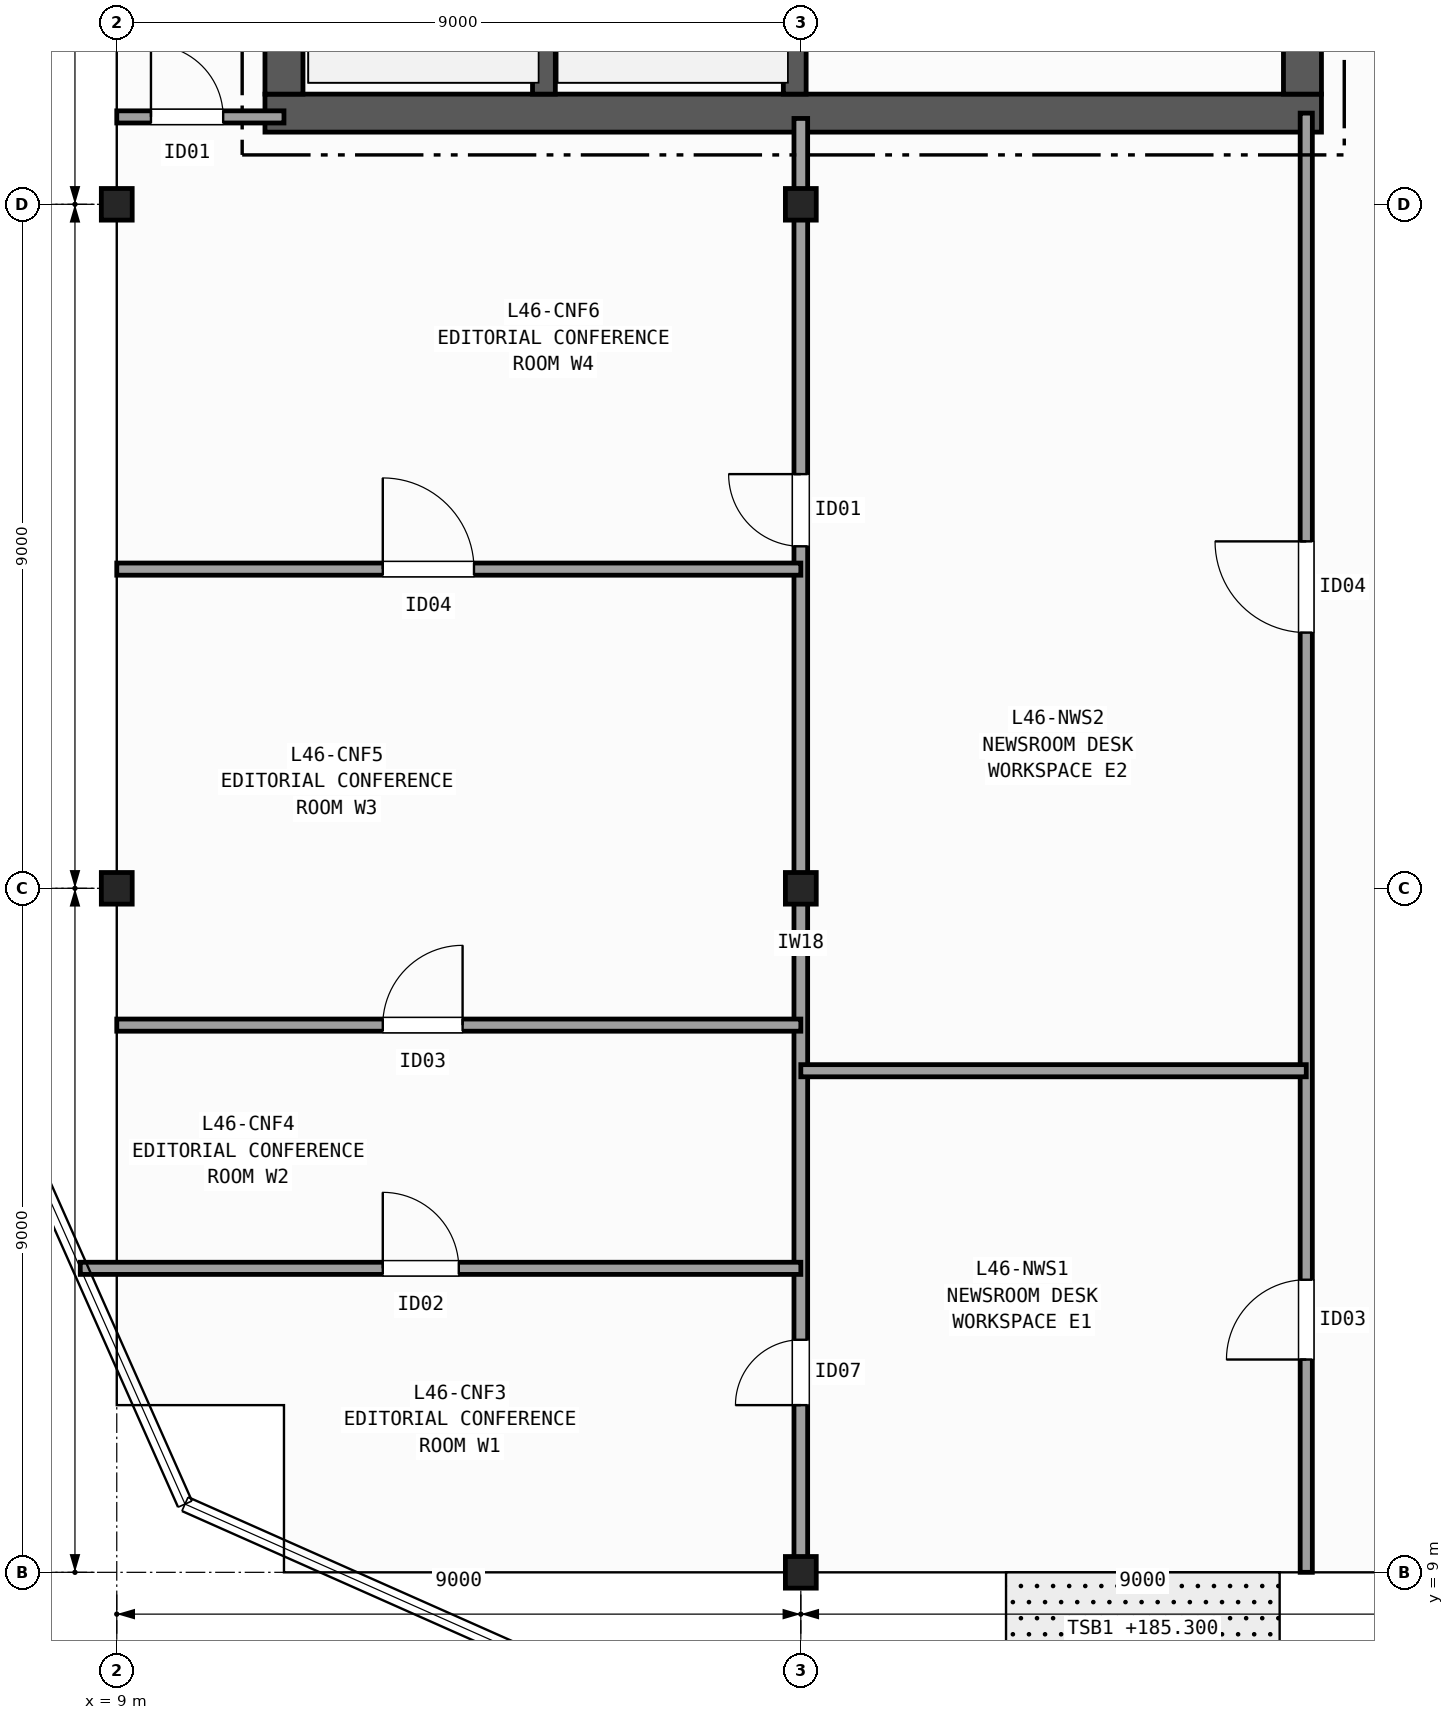
"""IFC4 building model, lengths in metres.
Left out: names, types, materials, properties, quantities, classifications, styles, units other than length and angle.
Written with IfcOpenShell. Run it as: python <this file> out.ifc"""

import sys

from ifc_helpers import new_model, si_unit, direction, frame, frame_2d, origin, origin_2d, place, context, subcontext, project, spatial, rectangle, i_section, extrude, element, fill, save


model = new_model("IFC4")
c1 = context("Model", 3, precision=1e-05, world=origin(), true_north=direction((0.0, 1.0)))
c2 = subcontext(c1, "Body", "Model", "MODEL_VIEW")
j1 = project(units=[si_unit("LENGTHUNIT", "METRE"), si_unit("PLANEANGLEUNIT", "RADIAN")], contexts=[c1])
p1 = place(None, origin())
s1 = spatial("IfcSite", under=j1, at=p1, CompositionType="ELEMENT")
p2 = place(p1, origin())
s2 = spatial("IfcBuilding", under=s1, at=p2, CompositionType="ELEMENT")
p3 = place(p2, frame((0.0, 0.0, 185.3)))
s3 = spatial("IfcBuildingStorey", under=s2, at=p3, CompositionType="ELEMENT", Elevation=185.3)
for number, where, z_axis, x_axis in (
    (1, (9.0, 18.0, 0.0), (0.0, 0.0, 1.0), (1.0, 0.0, 0.0)),
    (2, (9.0, 27.0, 0.0), (0.0, 0.0, 1.0), (1.0, 0.0, 0.0)),
    (3, (18.0, 9.0, 0.0), (0.0, 0.0, 1.0), (1.0, 0.0, 0.0)),
    (4, (18.0, 18.0, 0.0), (0.0, 0.0, 1.0), (1.0, 0.0, 0.0)),
    (5, (18.0, 27.0, 0.0), (0.0, 0.0, 1.0), (1.0, 0.0, 0.0)),
):
    element("IfcColumn", number, at=place(p3, frame(where, z_axis=z_axis, x_axis=x_axis)), inside=s3, PredefinedType="COLUMN", context=c2, shape_type="SweptSolid", body=[
        extrude(i_section(OverallWidth=0.406, OverallDepth=0.416, WebThickness=0.03, FlangeThickness=0.048, FilletRadius=0.015, at=origin_2d()), origin(), (0.0, 0.0, 1.0), 3.7),
    ])
p4 = place(p3, frame((10.95, 28.2, 0.0), z_axis=(0.0, 0.0, 1.0), x_axis=(1.0, 0.0, 0.0)))
e6 = element("IfcWall", 6, at=p4, inside=s3, PredefinedType="SHEAR", context=c2, shape_type="SweptSolid", body=[
    extrude(rectangle(XDim=13.9, YDim=0.5, at=frame_2d((6.95, 0.0))), origin(), (0.0, 0.0, 1.0), 3.42),
])
p5 = place(p3, frame((11.2, 42.15, 0.0), z_axis=(0.0, 0.0, 1.0), x_axis=(0.0, -1.0, 0.0)))
e7 = element("IfcWall", 7, at=p5, inside=s3, PredefinedType="SHEAR", context=c2, shape_type="SweptSolid", body=[
    extrude(rectangle(XDim=13.7, YDim=0.5, at=frame_2d((6.85, 0.0))), origin(), (0.0, 0.0, 1.0), 3.42),
])
p6 = place(p3, frame((24.6, 28.45, 0.0), z_axis=(0.0, 0.0, 1.0), x_axis=(0.0, 1.0, 0.0)))
e8 = element("IfcWall", 8, at=p6, inside=s3, PredefinedType="SHEAR", context=c2, shape_type="SweptSolid", body=[
    extrude(rectangle(XDim=13.7, YDim=0.5, at=frame_2d((6.85, 0.0))), origin(), (0.0, 0.0, 1.0), 3.42),
])
p7 = place(p6, frame((3.35, 0.0, 0.0)))
e9 = element("IfcOpeningElement", 9, at=p7, cuts=e8, PredefinedType="OPENING", context=c2, shape_type="SweptSolid", body=[
    extrude(rectangle(XDim=1.5, YDim=2.2, at=frame_2d((0.75, 1.1))), frame((0.0, 0.26, 0.0), z_axis=(0.0, -1.0, 0.0), x_axis=(1.0, 0.0, 0.0)), (0.0, 0.0, 1.0), 0.52),
])
p8 = place(p6, frame((9.95, 0.0, 0.0)))
e10 = element("IfcOpeningElement", 10, at=p8, cuts=e8, PredefinedType="OPENING", context=c2, shape_type="SweptSolid", body=[
    extrude(rectangle(XDim=0.9, YDim=2.1, at=frame_2d((0.45, 1.05))), frame((0.0, 0.26, 0.0), z_axis=(0.0, -1.0, 0.0), x_axis=(1.0, 0.0, 0.0)), (0.0, 0.0, 1.0), 0.52),
])
p9 = place(p6, frame((12.05, 0.0, 0.0)))
e11 = element("IfcOpeningElement", 11, at=p9, cuts=e8, PredefinedType="OPENING", context=c2, shape_type="SweptSolid", body=[
    extrude(rectangle(XDim=0.9, YDim=2.1, at=frame_2d((0.45, 1.05))), frame((0.0, 0.26, 0.0), z_axis=(0.0, -1.0, 0.0), x_axis=(1.0, 0.0, 0.0)), (0.0, 0.0, 1.0), 0.52),
])
p10 = place(p3, frame((14.62, 28.45, 0.0), z_axis=(0.0, 0.0, 1.0), x_axis=(0.0, 1.0, 0.0)))
e12 = element("IfcWall", 12, at=p10, inside=s3, PredefinedType="SHEAR", context=c2, shape_type="SweptSolid", body=[
    extrude(rectangle(XDim=9.0, YDim=0.3, at=frame_2d((4.5, 0.0))), origin(), (0.0, 0.0, 1.0), 3.42),
])
p11 = place(p3, frame((17.92, 42.15, 0.0), z_axis=(0.0, 0.0, 1.0), x_axis=(0.0, -1.0, 0.0)))
e13 = element("IfcWall", 13, at=p11, inside=s3, PredefinedType="SHEAR", context=c2, shape_type="SweptSolid", body=[
    extrude(rectangle(XDim=13.7, YDim=0.3, at=frame_2d((6.85, 0.0))), origin(), (0.0, 0.0, 1.0), 3.42),
])
p12 = place(p11, frame((1.975, 0.0, 0.0)))
e14 = element("IfcOpeningElement", 14, at=p12, cuts=e13, PredefinedType="OPENING", context=c2, shape_type="SweptSolid", body=[
    extrude(rectangle(XDim=1.15, YDim=2.15, at=frame_2d((0.575, 1.075))), frame((0.0, 0.16, 0.0), z_axis=(0.0, -1.0, 0.0), x_axis=(1.0, 0.0, 0.0)), (0.0, 0.0, 1.0), 0.32),
])
p13 = place(p3, frame((9.0, 28.15, 0.0), z_axis=(0.0, 0.0, 1.0), x_axis=(1.0, 0.0, 0.0)))
e15 = element("IfcWall", 15, at=p13, inside=s3, PredefinedType="PARTITIONING", context=c2, shape_type="SweptSolid", body=[
    extrude(rectangle(XDim=2.2, YDim=0.16, at=frame_2d((1.1, 0.0))), origin(), (0.0, 0.0, 1.0), 2.634),
])
p14 = place(p13, frame((0.45, 0.0, 0.0)))
e16 = element("IfcOpeningElement", 16, at=p14, cuts=e15, PredefinedType="OPENING", context=c2, shape_type="SweptSolid", body=[
    extrude(rectangle(XDim=0.95, YDim=2.1, at=frame_2d((0.475, 1.05))), frame((0.0, 0.09, 0.0), z_axis=(0.0, -1.0, 0.0), x_axis=(1.0, 0.0, 0.0)), (0.0, 0.0, 1.0), 0.18),
])
p15 = place(p3, frame((24.65, 9.0, 0.0), z_axis=(0.0, 0.0, 1.0), x_axis=(0.0, 1.0, 0.0)))
e17 = element("IfcWall", 17, at=p15, inside=s3, PredefinedType="PARTITIONING", context=c2, shape_type="SweptSolid", body=[
    extrude(rectangle(XDim=19.2, YDim=0.16, at=frame_2d((9.6, 0.0))), origin(), (0.0, 0.0, 1.0), 2.634),
])
p16 = place(p15, frame((2.8, 0.0, 0.0)))
e18 = element("IfcOpeningElement", 18, at=p16, cuts=e17, PredefinedType="OPENING", context=c2, shape_type="SweptSolid", body=[
    extrude(rectangle(XDim=1.05, YDim=2.15, at=frame_2d((0.525, 1.075))), frame((0.0, 0.09, 0.0), z_axis=(0.0, -1.0, 0.0), x_axis=(1.0, 0.0, 0.0)), (0.0, 0.0, 1.0), 0.18),
])
p17 = place(p15, frame((12.365, 0.0, 0.0)))
e19 = element("IfcOpeningElement", 19, at=p17, cuts=e17, PredefinedType="OPENING", context=c2, shape_type="SweptSolid", body=[
    extrude(rectangle(XDim=1.2, YDim=2.15, at=frame_2d((0.6, 1.075))), frame((0.0, 0.09, 0.0), z_axis=(0.0, -1.0, 0.0), x_axis=(1.0, 0.0, 0.0)), (0.0, 0.0, 1.0), 0.18),
])
p18 = place(p3, frame((18.0, 9.0, 0.0), z_axis=(0.0, 0.0, 1.0), x_axis=(0.0, 1.0, 0.0)))
e20 = element("IfcWall", 20, at=p18, inside=s3, PredefinedType="PARTITIONING", context=c2, shape_type="SweptSolid", body=[
    extrude(rectangle(XDim=19.13, YDim=0.18, at=frame_2d((9.565, 0.0))), origin(), (0.0, 0.0, 1.0), 2.634),
])
p19 = place(p18, frame((2.2, 0.0, 0.0)))
e21 = element("IfcOpeningElement", 21, at=p19, cuts=e20, PredefinedType="OPENING", context=c2, shape_type="SweptSolid", body=[
    extrude(rectangle(XDim=0.86, YDim=2.05, at=frame_2d((0.43, 1.025))), frame((0.0, 0.1, 0.0), z_axis=(0.0, -1.0, 0.0), x_axis=(1.0, 0.0, 0.0)), (0.0, 0.0, 1.0), 0.2),
])
p20 = place(p18, frame((13.5, 0.0, 0.0)))
e22 = element("IfcOpeningElement", 22, at=p20, cuts=e20, PredefinedType="OPENING", context=c2, shape_type="SweptSolid", body=[
    extrude(rectangle(XDim=0.95, YDim=2.1, at=frame_2d((0.475, 1.05))), frame((0.0, 0.1, 0.0), z_axis=(0.0, -1.0, 0.0), x_axis=(1.0, 0.0, 0.0)), (0.0, 0.0, 1.0), 0.2),
])
p21 = place(p3, frame((18.0, 15.6, 0.0), z_axis=(0.0, 0.0, 1.0), x_axis=(1.0, 0.0, 0.0)))
e23 = element("IfcWall", 23, at=p21, inside=s3, PredefinedType="PARTITIONING", context=c2, shape_type="SweptSolid", body=[
    extrude(rectangle(XDim=6.65, YDim=0.16, at=frame_2d((3.325, 0.0))), origin(), (0.0, 0.0, 1.0), 2.792),
])
p22 = place(p3, frame((8.52, 13.0, 0.0), z_axis=(0.0, 0.0, 1.0), x_axis=(1.0, 0.0, 0.0)))
e24 = element("IfcWall", 24, at=p22, inside=s3, PredefinedType="PARTITIONING", context=c2, shape_type="SweptSolid", body=[
    extrude(rectangle(XDim=9.48, YDim=0.16, at=frame_2d((4.74, 0.0))), origin(), (0.0, 0.0, 1.0), 2.792),
])
p23 = place(p22, frame((3.98, 0.0, 0.0)))
e25 = element("IfcOpeningElement", 25, at=p23, cuts=e24, PredefinedType="OPENING", context=c2, shape_type="SweptSolid", body=[
    extrude(rectangle(XDim=1.0, YDim=2.1, at=frame_2d((0.5, 1.05))), frame((0.0, 0.09, 0.0), z_axis=(0.0, -1.0, 0.0), x_axis=(1.0, 0.0, 0.0)), (0.0, 0.0, 1.0), 0.18),
])
p24 = place(p3, frame((9.0, 16.2, 0.0), z_axis=(0.0, 0.0, 1.0), x_axis=(1.0, 0.0, 0.0)))
e26 = element("IfcWall", 26, at=p24, inside=s3, PredefinedType="PARTITIONING", context=c2, shape_type="SweptSolid", body=[
    extrude(rectangle(XDim=9.0, YDim=0.16, at=frame_2d((4.5, 0.0))), origin(), (0.0, 0.0, 1.0), 2.792),
])
p25 = place(p24, frame((3.5, 0.0, 0.0)))
e27 = element("IfcOpeningElement", 27, at=p25, cuts=e26, PredefinedType="OPENING", context=c2, shape_type="SweptSolid", body=[
    extrude(rectangle(XDim=1.05, YDim=2.15, at=frame_2d((0.525, 1.075))), frame((0.0, 0.09, 0.0), z_axis=(0.0, -1.0, 0.0), x_axis=(1.0, 0.0, 0.0)), (0.0, 0.0, 1.0), 0.18),
])
p26 = place(p3, frame((9.0, 22.2, 0.0), z_axis=(0.0, 0.0, 1.0), x_axis=(1.0, 0.0, 0.0)))
e28 = element("IfcWall", 28, at=p26, inside=s3, PredefinedType="PARTITIONING", context=c2, shape_type="SweptSolid", body=[
    extrude(rectangle(XDim=9.0, YDim=0.16, at=frame_2d((4.5, 0.0))), origin(), (0.0, 0.0, 1.0), 2.634),
])
p27 = place(p26, frame((3.5, 0.0, 0.0)))
e29 = element("IfcOpeningElement", 29, at=p27, cuts=e28, PredefinedType="OPENING", context=c2, shape_type="SweptSolid", body=[
    extrude(rectangle(XDim=1.2, YDim=2.15, at=frame_2d((0.6, 1.075))), frame((0.0, 0.09, 0.0), z_axis=(0.0, -1.0, 0.0), x_axis=(1.0, 0.0, 0.0)), (0.0, 0.0, 1.0), 0.18),
])
p28 = place(p14, origin())
e30 = element("IfcDoor", 30, at=p28, inside=s3, OperationType="SINGLE_SWING_LEFT", PredefinedType="DOOR", context=c2, shape_type="SweptSolid", body=[
    extrude(rectangle(XDim=0.95, YDim=2.1, at=frame_2d((0.475, 1.05))), frame((0.0, 0.025, 0.0), z_axis=(0.0, -1.0, 0.0), x_axis=(1.0, 0.0, 0.0)), (0.0, 0.0, 1.0), 0.05),
])
fill(e16, e30)
p29 = place(p16, origin())
e31 = element("IfcDoor", 31, at=p29, inside=s3, OperationType="SINGLE_SWING_LEFT", PredefinedType="DOOR", context=c2, shape_type="SweptSolid", body=[
    extrude(rectangle(XDim=1.05, YDim=2.15, at=frame_2d((0.525, 1.075))), frame((0.0, 0.025, 0.0), z_axis=(0.0, -1.0, 0.0), x_axis=(1.0, 0.0, 0.0)), (0.0, 0.0, 1.0), 0.05),
])
fill(e18, e31)
p30 = place(p17, origin())
e32 = element("IfcDoor", 32, at=p30, inside=s3, OperationType="SINGLE_SWING_RIGHT", PredefinedType="DOOR", context=c2, shape_type="SweptSolid", body=[
    extrude(rectangle(XDim=1.2, YDim=2.15, at=frame_2d((0.6, 1.075))), frame((0.0, 0.025, 0.0), z_axis=(0.0, -1.0, 0.0), x_axis=(1.0, 0.0, 0.0)), (0.0, 0.0, 1.0), 0.05),
])
fill(e19, e32)
p31 = place(p19, origin())
e33 = element("IfcDoor", 33, at=p31, inside=s3, OperationType="SINGLE_SWING_LEFT", PredefinedType="DOOR", context=c2, shape_type="SweptSolid", body=[
    extrude(rectangle(XDim=0.86, YDim=2.05, at=frame_2d((0.43, 1.025))), frame((0.0, 0.025, 0.0), z_axis=(0.0, -1.0, 0.0), x_axis=(1.0, 0.0, 0.0)), (0.0, 0.0, 1.0), 0.05),
])
fill(e21, e33)
p32 = place(p20, origin())
e34 = element("IfcDoor", 34, at=p32, inside=s3, OperationType="SINGLE_SWING_RIGHT", PredefinedType="DOOR", context=c2, shape_type="SweptSolid", body=[
    extrude(rectangle(XDim=0.95, YDim=2.1, at=frame_2d((0.475, 1.05))), frame((0.0, 0.025, 0.0), z_axis=(0.0, -1.0, 0.0), x_axis=(1.0, 0.0, 0.0)), (0.0, 0.0, 1.0), 0.05),
])
fill(e22, e34)
p33 = place(p23, origin())
e35 = element("IfcDoor", 35, at=p33, inside=s3, OperationType="SINGLE_SWING_LEFT", PredefinedType="DOOR", context=c2, shape_type="SweptSolid", body=[
    extrude(rectangle(XDim=1.0, YDim=2.1, at=frame_2d((0.5, 1.05))), frame((0.0, 0.025, 0.0), z_axis=(0.0, -1.0, 0.0), x_axis=(1.0, 0.0, 0.0)), (0.0, 0.0, 1.0), 0.05),
])
fill(e25, e35)
p34 = place(p25, origin())
e36 = element("IfcDoor", 36, at=p34, inside=s3, OperationType="SINGLE_SWING_RIGHT", PredefinedType="DOOR", context=c2, shape_type="SweptSolid", body=[
    extrude(rectangle(XDim=1.05, YDim=2.15, at=frame_2d((0.525, 1.075))), frame((0.0, 0.025, 0.0), z_axis=(0.0, -1.0, 0.0), x_axis=(1.0, 0.0, 0.0)), (0.0, 0.0, 1.0), 0.05),
])
fill(e27, e36)
p35 = place(p27, origin())
e37 = element("IfcDoor", 37, at=p35, inside=s3, OperationType="SINGLE_SWING_LEFT", PredefinedType="DOOR", context=c2, shape_type="SweptSolid", body=[
    extrude(rectangle(XDim=1.2, YDim=2.15, at=frame_2d((0.6, 1.075))), frame((0.0, 0.025, 0.0), z_axis=(0.0, -1.0, 0.0), x_axis=(1.0, 0.0, 0.0)), (0.0, 0.0, 1.0), 0.05),
])
fill(e29, e37)
save(model, sys.argv[1])
